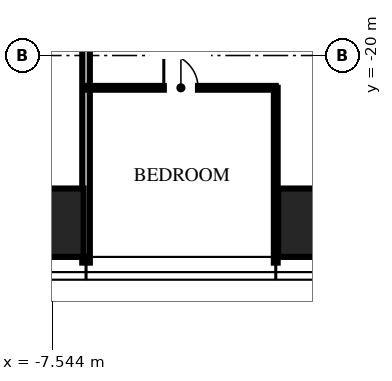
"""IFC4 building model, lengths in metres.
Left out: names, types, materials, properties, quantities, classifications, styles, units other than length and angle.
Written with IfcOpenShell. Run it as: python <this file> out.ifc"""

import sys

from ifc_helpers import new_model, si_unit, direction, frame, frame_2d, origin, origin_2d, place, context, subcontext, project, spatial, rectangle, hollow_rectangle, extrude, element, fill, save


model = new_model("IFC4")
c1 = context("Model", 3, precision=1e-05, world=origin(), true_north=direction((0.0, 1.0)))
c2 = subcontext(c1, "Body", "Model", "MODEL_VIEW")
j1 = project(units=[si_unit("LENGTHUNIT", "METRE"), si_unit("PLANEANGLEUNIT", "RADIAN")], contexts=[c1])
p1 = place(None, origin())
s1 = spatial("IfcSite", under=j1, at=p1, CompositionType="ELEMENT")
p2 = place(p1, origin())
s2 = spatial("IfcBuilding", under=s1, at=p2, CompositionType="ELEMENT")
p3 = place(p2, frame((0.0, 0.0, 263.25)))
s3 = spatial("IfcBuildingStorey", under=s2, at=p3, CompositionType="ELEMENT", Elevation=263.25)
for number, where, z_axis, x_axis in (
    (1, (0.0, -24.4, 0.0), (0.0, 0.0, 1.0), (1.0, 0.0, 0.0)),
    (2, (-8.32, -24.4, 0.0), (0.0, 0.0, 1.0), (1.0, 0.0, 0.0)),
):
    element("IfcColumn", number, at=place(p3, frame(where, z_axis=z_axis, x_axis=x_axis)), inside=s3, PredefinedType="COLUMN", context=c2, shape_type="SweptSolid", body=[
        extrude(hollow_rectangle(XDim=3.2, YDim=1.8, WallThickness=0.14, at=origin_2d()), origin(), (0.0, 0.0, 1.0), 3.75),
    ])
p4 = place(p3, frame((-6.656, -12.8, 0.0), z_axis=(0.0, 0.0, 1.0), x_axis=(0.0, -1.0, 0.0)))
e3 = element("IfcWall", 3, at=p4, inside=s3, PredefinedType="PARTITIONING", context=c2, shape_type="SweptSolid", body=[
    extrude(rectangle(XDim=12.65, YDim=0.2, at=frame_2d((6.325, 0.0))), origin(), (0.0, 0.0, 1.0), 2.91),
])
p5 = place(p3, frame((-1.664, -20.85, 0.0), z_axis=(0.0, 0.0, 1.0), x_axis=(0.0, -1.0, 0.0)))
e4 = element("IfcWall", 4, at=p5, inside=s3, PredefinedType="PARTITIONING", context=c2, shape_type="SweptSolid", body=[
    extrude(rectangle(XDim=4.6, YDim=0.1, at=frame_2d((2.3, 0.0))), origin(), (0.0, 0.0, 1.0), 2.91),
])
p6 = place(p3, frame((-6.656, -20.85, 0.0), z_axis=(0.0, 0.0, 1.0), x_axis=(1.0, 0.0, 0.0)))
e5 = element("IfcWall", 5, at=p6, inside=s3, PredefinedType="PARTITIONING", context=c2, shape_type="SweptSolid", body=[
    extrude(rectangle(XDim=4.992, YDim=0.1, at=frame_2d((2.496, 0.0))), origin(), (0.0, 0.0, 1.0), 2.81),
])
p7 = place(p6, frame((2.046, 0.0, 0.0)))
e6 = element("IfcOpeningElement", 6, at=p7, cuts=e5, PredefinedType="OPENING", context=c2, shape_type="SweptSolid", body=[
    extrude(rectangle(XDim=0.9, YDim=2.1, at=frame_2d((0.45, 1.05))), frame((0.0, 0.06, 0.0), z_axis=(0.0, -1.0, 0.0), x_axis=(1.0, 0.0, 0.0)), (0.0, 0.0, 1.0), 0.12),
])
p8 = place(p7, origin())
e7 = element("IfcDoor", 7, at=p8, inside=s3, OperationType="SINGLE_SWING_LEFT", PredefinedType="DOOR", context=c2, shape_type="SweptSolid", body=[
    extrude(rectangle(XDim=0.9, YDim=2.1, at=frame_2d((0.45, 1.05))), frame((0.0, 0.025, 0.0), z_axis=(0.0, -1.0, 0.0), x_axis=(1.0, 0.0, 0.0)), (0.0, 0.0, 1.0), 0.05),
])
fill(e6, e7)
save(model, sys.argv[1])
